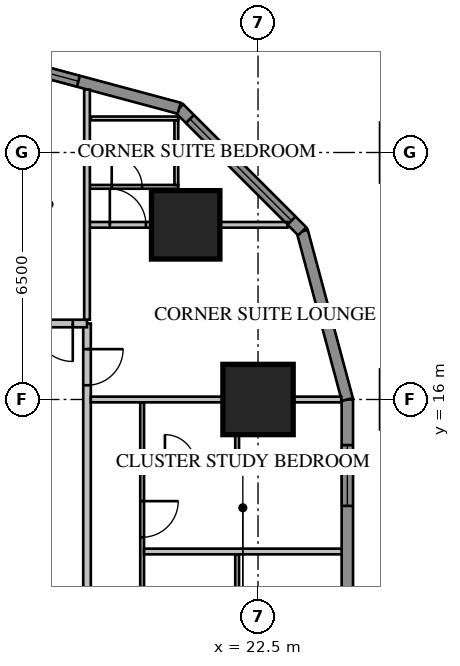
"""IFC4 building model, lengths in metres.
Left out: names, types, materials, properties, quantities, classifications, styles, units other than length and angle.
Written with IfcOpenShell. Run it as: python <this file> out.ifc"""

import sys

from ifc_helpers import new_model, si_unit, direction, frame, frame_2d, origin, origin_2d, place, context, subcontext, project, spatial, rectangle, extrude, element, fill, save


model = new_model("IFC4")
c1 = context("Model", 3, precision=1e-05, world=origin(), true_north=direction((0.0, 1.0)))
c2 = subcontext(c1, "Body", "Model", "MODEL_VIEW")
j1 = project(units=[si_unit("LENGTHUNIT", "METRE"), si_unit("PLANEANGLEUNIT", "RADIAN")], contexts=[c1])
p1 = place(None, origin())
s1 = spatial("IfcSite", under=j1, at=p1, CompositionType="ELEMENT")
p2 = place(p1, origin())
s2 = spatial("IfcBuilding", under=s1, at=p2, CompositionType="ELEMENT")
p3 = place(p2, frame((0.0, 0.0, 42.95)))
s3 = spatial("IfcBuildingStorey", under=s2, at=p3, CompositionType="ELEMENT", Elevation=42.95)
p4 = place(p3, frame((22.5, 16.0, 0.0), z_axis=(0.0, 0.0, 1.0), x_axis=(1.0, 0.0, 0.0)))
e1 = element("IfcColumn", 1, at=p4, inside=s3, PredefinedType="COLUMN", context=c2, shape_type="SweptSolid", body=[
    extrude(rectangle(XDim=1.85, YDim=1.85, at=origin_2d()), origin(), (0.0, 0.0, 1.0), 3.85),
])
p5 = place(p3, frame((20.596, 20.596, 0.0), z_axis=(0.0, 0.0, 1.0), x_axis=(1.0, 0.0, 0.0)))
e2 = element("IfcColumn", 2, at=p5, inside=s3, PredefinedType="COLUMN", context=c2, shape_type="SweptSolid", body=[
    extrude(rectangle(XDim=1.8, YDim=1.8, at=origin_2d()), origin(), (0.0, 0.0, 1.0), 3.85),
])
p6 = place(p3, frame((24.85, -16.0, 0.0), z_axis=(0.0, 0.0, 1.0), x_axis=(0.0, 1.0, 0.0)))
e3 = element("IfcWall", 3, at=p6, inside=s3, PredefinedType="SOLIDWALL", context=c2, shape_type="SweptSolid", body=[
    extrude(rectangle(XDim=32.0, YDim=0.3, at=frame_2d((16.0, 0.0))), origin(), (0.0, 0.0, 1.0), 3.65),
])
p7 = place(p6, frame((1.2, 0.0, 0.75)))
e4 = element("IfcOpeningElement", 4, at=p7, cuts=e3, PredefinedType="OPENING", context=c2, shape_type="SweptSolid", body=[
    extrude(rectangle(XDim=1.6, YDim=1.8, at=frame_2d((0.8, 0.9))), frame((0.0, 0.17, 0.0), z_axis=(0.0, -1.0, 0.0), x_axis=(1.0, 0.0, 0.0)), (0.0, 0.0, 1.0), 0.34),
])
p8 = place(p6, frame((5.2, 0.0, 0.75)))
e5 = element("IfcOpeningElement", 5, at=p8, cuts=e3, PredefinedType="OPENING", context=c2, shape_type="SweptSolid", body=[
    extrude(rectangle(XDim=1.6, YDim=1.8, at=frame_2d((0.8, 0.9))), frame((0.0, 0.17, 0.0), z_axis=(0.0, -1.0, 0.0), x_axis=(1.0, 0.0, 0.0)), (0.0, 0.0, 1.0), 0.34),
])
p9 = place(p6, frame((17.2, 0.0, 0.75)))
e6 = element("IfcOpeningElement", 6, at=p9, cuts=e3, PredefinedType="OPENING", context=c2, shape_type="SweptSolid", body=[
    extrude(rectangle(XDim=1.6, YDim=1.8, at=frame_2d((0.8, 0.9))), frame((0.0, 0.17, 0.0), z_axis=(0.0, -1.0, 0.0), x_axis=(1.0, 0.0, 0.0)), (0.0, 0.0, 1.0), 0.34),
])
p10 = place(p6, frame((21.2, 0.0, 0.75)))
e7 = element("IfcOpeningElement", 7, at=p10, cuts=e3, PredefinedType="OPENING", context=c2, shape_type="SweptSolid", body=[
    extrude(rectangle(XDim=1.6, YDim=1.8, at=frame_2d((0.8, 0.9))), frame((0.0, 0.17, 0.0), z_axis=(0.0, -1.0, 0.0), x_axis=(1.0, 0.0, 0.0)), (0.0, 0.0, 1.0), 0.34),
])
p11 = place(p6, frame((25.2, 0.0, 0.75)))
e8 = element("IfcOpeningElement", 8, at=p11, cuts=e3, PredefinedType="OPENING", context=c2, shape_type="SweptSolid", body=[
    extrude(rectangle(XDim=1.6, YDim=1.8, at=frame_2d((0.8, 0.9))), frame((0.0, 0.17, 0.0), z_axis=(0.0, -1.0, 0.0), x_axis=(1.0, 0.0, 0.0)), (0.0, 0.0, 1.0), 0.34),
])
p12 = place(p6, frame((29.2, 0.0, 0.75)))
e9 = element("IfcOpeningElement", 9, at=p12, cuts=e3, PredefinedType="OPENING", context=c2, shape_type="SweptSolid", body=[
    extrude(rectangle(XDim=1.6, YDim=1.8, at=frame_2d((0.8, 0.9))), frame((0.0, 0.17, 0.0), z_axis=(0.0, -1.0, 0.0), x_axis=(1.0, 0.0, 0.0)), (0.0, 0.0, 1.0), 0.34),
])
p13 = place(p6, frame((8.8, 0.0, 0.75)))
e10 = element("IfcOpeningElement", 10, at=p13, cuts=e3, PredefinedType="OPENING", context=c2, shape_type="SweptSolid", body=[
    extrude(rectangle(XDim=2.4, YDim=1.8, at=frame_2d((1.2, 0.9))), frame((0.0, 0.17, 0.0), z_axis=(0.0, -1.0, 0.0), x_axis=(1.0, 0.0, 0.0)), (0.0, 0.0, 1.0), 0.34),
])
p14 = place(p6, frame((13.812, 0.0, 0.0)))
e11 = element("IfcOpeningElement", 11, at=p14, cuts=e3, PredefinedType="OPENING", context=c2, shape_type="SweptSolid", body=[
    extrude(rectangle(XDim=1.0, YDim=2.4, at=frame_2d((0.5, 1.2))), frame((0.0, 0.17, 0.0), z_axis=(0.0, -1.0, 0.0), x_axis=(1.0, 0.0, 0.0)), (0.0, 0.0, 1.0), 0.34),
])
p15 = place(p3, frame((24.85, 16.0, 0.0), z_axis=(0.0, 0.0, 1.0), x_axis=(-0.258839972501, 0.965920218567, 0.0)))
e12 = element("IfcWall", 12, at=p15, inside=s3, PredefinedType="SOLIDWALL", context=c2, shape_type="SweptSolid", body=[
    extrude(rectangle(XDim=4.581, YDim=0.3, at=frame_2d((2.291, 0.0))), origin(), (0.0, 0.0, 1.0), 3.65),
])
p16 = place(p3, frame((23.664, 20.425, 0.0), z_axis=(0.0, 0.0, 1.0), x_axis=(-0.707106781187, 0.707106781187, 0.0)))
e13 = element("IfcWall", 13, at=p16, inside=s3, PredefinedType="SOLIDWALL", context=c2, shape_type="SweptSolid", body=[
    extrude(rectangle(XDim=4.581, YDim=0.3, at=frame_2d((2.291, 0.0))), origin(), (0.0, 0.0, 1.0), 3.65),
])
p17 = place(p16, frame((0.4, 0.0, 0.75)))
e14 = element("IfcOpeningElement", 14, at=p17, cuts=e13, PredefinedType="OPENING", context=c2, shape_type="SweptSolid", body=[
    extrude(rectangle(XDim=3.781, YDim=1.8, at=frame_2d((1.891, 0.9))), frame((0.0, 0.17, 0.0), z_axis=(0.0, -1.0, 0.0), x_axis=(1.0, 0.0, 0.0)), (0.0, 0.0, 1.0), 0.34),
])
p18 = place(p3, frame((20.425, 23.664, 0.0), z_axis=(0.0, 0.0, 1.0), x_axis=(-0.965920218567, 0.258839972501, 0.0)))
e15 = element("IfcWall", 15, at=p18, inside=s3, PredefinedType="SOLIDWALL", context=c2, shape_type="SweptSolid", body=[
    extrude(rectangle(XDim=4.581, YDim=0.3, at=frame_2d((2.291, 0.0))), origin(), (0.0, 0.0, 1.0), 3.65),
])
p19 = place(p18, frame((2.746, 0.0, 0.75)))
e16 = element("IfcOpeningElement", 16, at=p19, cuts=e15, PredefinedType="OPENING", context=c2, shape_type="SweptSolid", body=[
    extrude(rectangle(XDim=1.6, YDim=1.8, at=frame_2d((0.8, 0.9))), frame((0.0, 0.17, 0.0), z_axis=(0.0, -1.0, 0.0), x_axis=(1.0, 0.0, 0.0)), (0.0, 0.0, 1.0), 0.34),
])
p20 = place(p3, frame((18.0, -18.0, 0.0), z_axis=(0.0, 0.0, 1.0), x_axis=(0.0, 1.0, 0.0)))
e17 = element("IfcWall", 17, at=p20, inside=s3, PredefinedType="PARTITIONING", context=c2, shape_type="SweptSolid", body=[
    extrude(rectangle(XDim=36.0, YDim=0.2, at=frame_2d((18.0, 0.0))), origin(), (0.0, 0.0, 1.0), 3.65),
])
p21 = place(p20, frame((10.4, 0.0, 0.0)))
e18 = element("IfcOpeningElement", 18, at=p21, cuts=e17, PredefinedType="OPENING", context=c2, shape_type="SweptSolid", body=[
    extrude(rectangle(XDim=1.0, YDim=2.1, at=frame_2d((0.5, 1.05))), frame((0.0, 0.12, 0.0), z_axis=(0.0, -1.0, 0.0), x_axis=(1.0, 0.0, 0.0)), (0.0, 0.0, 1.0), 0.24),
])
p22 = place(p20, frame((14.4, 0.0, 0.0)))
e19 = element("IfcOpeningElement", 19, at=p22, cuts=e17, PredefinedType="OPENING", context=c2, shape_type="SweptSolid", body=[
    extrude(rectangle(XDim=1.0, YDim=2.1, at=frame_2d((0.5, 1.05))), frame((0.0, 0.12, 0.0), z_axis=(0.0, -1.0, 0.0), x_axis=(1.0, 0.0, 0.0)), (0.0, 0.0, 1.0), 0.24),
])
p23 = place(p20, frame((0.375, 0.0, 0.0)))
e20 = element("IfcOpeningElement", 20, at=p23, cuts=e17, PredefinedType="OPENING", context=c2, shape_type="SweptSolid", body=[
    extrude(rectangle(XDim=1.0, YDim=2.1, at=frame_2d((0.5, 1.05))), frame((0.0, 0.12, 0.0), z_axis=(0.0, -1.0, 0.0), x_axis=(1.0, 0.0, 0.0)), (0.0, 0.0, 1.0), 0.24),
])
p24 = place(p20, frame((34.375, 0.0, 0.0)))
e21 = element("IfcOpeningElement", 21, at=p24, cuts=e17, PredefinedType="OPENING", context=c2, shape_type="SweptSolid", body=[
    extrude(rectangle(XDim=0.95, YDim=2.1, at=frame_2d((0.475, 1.05))), frame((0.0, 0.12, 0.0), z_axis=(0.0, -1.0, 0.0), x_axis=(1.0, 0.0, 0.0)), (0.0, 0.0, 1.0), 0.24),
])
p25 = place(p3, frame((19.45, -3.925, 0.0), z_axis=(0.0, 0.0, 1.0), x_axis=(0.0, 1.0, 0.0)))
e22 = element("IfcWall", 22, at=p25, inside=s3, PredefinedType="PARTITIONING", context=c2, shape_type="SweptSolid", body=[
    extrude(rectangle(XDim=19.85, YDim=0.1, at=frame_2d((9.925, 0.0))), origin(), (0.0, 0.0, 1.0), 3.65),
])
p26 = place(p25, frame((2.125, 0.0, 0.0)))
e23 = element("IfcOpeningElement", 23, at=p26, cuts=e22, PredefinedType="OPENING", context=c2, shape_type="SweptSolid", body=[
    extrude(rectangle(XDim=1.0, YDim=2.1, at=frame_2d((0.5, 1.05))), frame((0.0, 0.07, 0.0), z_axis=(0.0, -1.0, 0.0), x_axis=(1.0, 0.0, 0.0)), (0.0, 0.0, 1.0), 0.14),
])
p27 = place(p25, frame((0.3, 0.0, 0.0)))
e24 = element("IfcOpeningElement", 24, at=p27, cuts=e22, PredefinedType="OPENING", context=c2, shape_type="SweptSolid", body=[
    extrude(rectangle(XDim=0.8, YDim=2.1, at=frame_2d((0.4, 1.05))), frame((0.0, 0.07, 0.0), z_axis=(0.0, -1.0, 0.0), x_axis=(1.0, 0.0, 0.0)), (0.0, 0.0, 1.0), 0.14),
])
p28 = place(p25, frame((4.3, 0.0, 0.0)))
e25 = element("IfcOpeningElement", 25, at=p28, cuts=e22, PredefinedType="OPENING", context=c2, shape_type="SweptSolid", body=[
    extrude(rectangle(XDim=0.95, YDim=2.1, at=frame_2d((0.475, 1.05))), frame((0.0, 0.07, 0.0), z_axis=(0.0, -1.0, 0.0), x_axis=(1.0, 0.0, 0.0)), (0.0, 0.0, 1.0), 0.14),
])
p29 = place(p25, frame((8.3, 0.0, 0.0)))
e26 = element("IfcOpeningElement", 26, at=p29, cuts=e22, PredefinedType="OPENING", context=c2, shape_type="SweptSolid", body=[
    extrude(rectangle(XDim=0.95, YDim=2.1, at=frame_2d((0.475, 1.05))), frame((0.0, 0.07, 0.0), z_axis=(0.0, -1.0, 0.0), x_axis=(1.0, 0.0, 0.0)), (0.0, 0.0, 1.0), 0.14),
])
p30 = place(p25, frame((12.3, 0.0, 0.0)))
e27 = element("IfcOpeningElement", 27, at=p30, cuts=e22, PredefinedType="OPENING", context=c2, shape_type="SweptSolid", body=[
    extrude(rectangle(XDim=0.95, YDim=2.1, at=frame_2d((0.475, 1.05))), frame((0.0, 0.07, 0.0), z_axis=(0.0, -1.0, 0.0), x_axis=(1.0, 0.0, 0.0)), (0.0, 0.0, 1.0), 0.14),
])
p31 = place(p25, frame((16.3, 0.0, 0.0)))
e28 = element("IfcOpeningElement", 28, at=p31, cuts=e22, PredefinedType="OPENING", context=c2, shape_type="SweptSolid", body=[
    extrude(rectangle(XDim=0.95, YDim=2.1, at=frame_2d((0.475, 1.05))), frame((0.0, 0.07, 0.0), z_axis=(0.0, -1.0, 0.0), x_axis=(1.0, 0.0, 0.0)), (0.0, 0.0, 1.0), 0.14),
])
p32 = place(p3, frame((19.5, 12.0, 0.0), z_axis=(0.0, 0.0, 1.0), x_axis=(1.0, 0.0, 0.0)))
e29 = element("IfcWall", 29, at=p32, inside=s3, PredefinedType="PARTITIONING", context=c2, shape_type="SweptSolid", body=[
    extrude(rectangle(XDim=5.2, YDim=0.15, at=frame_2d((2.6, 0.0))), origin(), (0.0, 0.0, 1.0), 3.65),
])
p33 = place(p3, frame((18.1, 16.0, 0.0), z_axis=(0.0, 0.0, 1.0), x_axis=(1.0, 0.0, 0.0)))
e30 = element("IfcWall", 30, at=p33, inside=s3, PredefinedType="PARTITIONING", context=c2, shape_type="SweptSolid", body=[
    extrude(rectangle(XDim=6.589, YDim=0.15, at=frame_2d((3.295, 0.0))), origin(), (0.0, 0.0, 1.0), 3.65),
])
p34 = place(p3, frame((21.95, 10.325, 0.0), z_axis=(0.0, 0.0, 1.0), x_axis=(0.0, 1.0, 0.0)))
e31 = element("IfcWall", 31, at=p34, inside=s3, PredefinedType="PARTITIONING", context=c2, shape_type="SweptSolid", body=[
    extrude(rectangle(XDim=1.6, YDim=0.1, at=frame_2d((0.8, 0.0))), origin(), (0.0, 0.0, 1.0), 3.65),
])
p35 = place(p3, frame((19.5, 14.275, 0.0), z_axis=(0.0, 0.0, 1.0), x_axis=(1.0, 0.0, 0.0)))
e32 = element("IfcWall", 32, at=p35, inside=s3, PredefinedType="PARTITIONING", context=c2, shape_type="SweptSolid", body=[
    extrude(rectangle(XDim=2.5, YDim=0.1, at=frame_2d((1.25, 0.0))), origin(), (0.0, 0.0, 1.0), 3.65),
])
p36 = place(p35, frame((0.55, 0.0, 0.0)))
e33 = element("IfcOpeningElement", 33, at=p36, cuts=e32, PredefinedType="OPENING", context=c2, shape_type="SweptSolid", body=[
    extrude(rectangle(XDim=0.8, YDim=2.1, at=frame_2d((0.4, 1.05))), frame((0.0, 0.07, 0.0), z_axis=(0.0, -1.0, 0.0), x_axis=(1.0, 0.0, 0.0)), (0.0, 0.0, 1.0), 0.14),
])
p37 = place(p3, frame((21.95, 14.325, 0.0), z_axis=(0.0, 0.0, 1.0), x_axis=(0.0, 1.0, 0.0)))
e34 = element("IfcWall", 34, at=p37, inside=s3, PredefinedType="PARTITIONING", context=c2, shape_type="SweptSolid", body=[
    extrude(rectangle(XDim=1.6, YDim=0.1, at=frame_2d((0.8, 0.0))), origin(), (0.0, 0.0, 1.0), 3.65),
])
p38 = place(p3, frame((18.065, 21.596, 0.0), z_axis=(0.0, 0.0, 1.0), x_axis=(1.0, 0.0, 0.0)))
e35 = element("IfcWall", 35, at=p38, inside=s3, PredefinedType="PARTITIONING", context=c2, shape_type="SweptSolid", body=[
    extrude(rectangle(XDim=2.335, YDim=0.1, at=frame_2d((1.167, 0.0))), origin(), (0.0, 0.0, 1.0), 3.65),
])
p39 = place(p38, frame((0.585, 0.0, 0.0)))
e36 = element("IfcOpeningElement", 36, at=p39, cuts=e35, PredefinedType="OPENING", context=c2, shape_type="SweptSolid", body=[
    extrude(rectangle(XDim=0.8, YDim=2.1, at=frame_2d((0.4, 1.05))), frame((0.0, 0.07, 0.0), z_axis=(0.0, -1.0, 0.0), x_axis=(1.0, 0.0, 0.0)), (0.0, 0.0, 1.0), 0.14),
])
p40 = place(p3, frame((20.35, 21.646, 0.0), z_axis=(0.0, 0.0, 1.0), x_axis=(0.0, 1.0, 0.0)))
e37 = element("IfcWall", 37, at=p40, inside=s3, PredefinedType="PARTITIONING", context=c2, shape_type="SweptSolid", body=[
    extrude(rectangle(XDim=1.7, YDim=0.1, at=frame_2d((0.85, 0.0))), origin(), (0.0, 0.0, 1.0), 3.65),
])
p41 = place(p3, frame((18.1, 23.396, 0.0), z_axis=(0.0, 0.0, 1.0), x_axis=(1.0, 0.0, 0.0)))
e38 = element("IfcWall", 38, at=p41, inside=s3, PredefinedType="PARTITIONING", context=c2, shape_type="SweptSolid", body=[
    extrude(rectangle(XDim=2.3, YDim=0.1, at=frame_2d((1.15, 0.0))), origin(), (0.0, 0.0, 1.0), 3.65),
])
p42 = place(p3, frame((18.065, 20.596, 0.0), z_axis=(0.0, 0.0, 1.0), x_axis=(1.0, 0.0, 0.0)))
e39 = element("IfcWall", 39, at=p42, inside=s3, PredefinedType="PARTITIONING", context=c2, shape_type="SweptSolid", body=[
    extrude(rectangle(XDim=5.209, YDim=0.15, at=frame_2d((2.604, 0.0))), origin(), (0.0, 0.0, 1.0), 3.65),
])
p43 = place(p42, frame((0.535, 0.0, 0.0)))
e40 = element("IfcOpeningElement", 40, at=p43, cuts=e39, PredefinedType="OPENING", context=c2, shape_type="SweptSolid", body=[
    extrude(rectangle(XDim=0.95, YDim=2.1, at=frame_2d((0.475, 1.05))), frame((0.0, 0.095, 0.0), z_axis=(0.0, -1.0, 0.0), x_axis=(1.0, 0.0, 0.0)), (0.0, 0.0, 1.0), 0.19),
])
p44 = place(p3, frame((18.0, 18.0, 0.0), z_axis=(0.0, 0.0, 1.0), x_axis=(-1.0, 0.0, 0.0)))
e41 = element("IfcWall", 41, at=p44, inside=s3, PredefinedType="PARTITIONING", context=c2, shape_type="SweptSolid", body=[
    extrude(rectangle(XDim=36.0, YDim=0.2, at=frame_2d((18.0, 0.0))), origin(), (0.0, 0.0, 1.0), 3.65),
])
p45 = place(p44, frame((0.375, 0.0, 0.0)))
e42 = element("IfcOpeningElement", 42, at=p45, cuts=e41, PredefinedType="OPENING", context=c2, shape_type="SweptSolid", body=[
    extrude(rectangle(XDim=1.0, YDim=2.1, at=frame_2d((0.5, 1.05))), frame((0.0, 0.12, 0.0), z_axis=(0.0, -1.0, 0.0), x_axis=(1.0, 0.0, 0.0)), (0.0, 0.0, 1.0), 0.24),
])
p46 = place(p44, frame((3.95, 0.0, 0.0)))
e43 = element("IfcOpeningElement", 43, at=p46, cuts=e41, PredefinedType="OPENING", context=c2, shape_type="SweptSolid", body=[
    extrude(rectangle(XDim=0.95, YDim=2.1, at=frame_2d((0.475, 1.05))), frame((0.0, 0.12, 0.0), z_axis=(0.0, -1.0, 0.0), x_axis=(1.0, 0.0, 0.0)), (0.0, 0.0, 1.0), 0.24),
])
p47 = place(p44, frame((7.95, 0.0, 0.0)))
e44 = element("IfcOpeningElement", 44, at=p47, cuts=e41, PredefinedType="OPENING", context=c2, shape_type="SweptSolid", body=[
    extrude(rectangle(XDim=0.95, YDim=2.1, at=frame_2d((0.475, 1.05))), frame((0.0, 0.12, 0.0), z_axis=(0.0, -1.0, 0.0), x_axis=(1.0, 0.0, 0.0)), (0.0, 0.0, 1.0), 0.24),
])
p48 = place(p44, frame((19.95, 0.0, 0.0)))
e45 = element("IfcOpeningElement", 45, at=p48, cuts=e41, PredefinedType="OPENING", context=c2, shape_type="SweptSolid", body=[
    extrude(rectangle(XDim=0.95, YDim=2.1, at=frame_2d((0.475, 1.05))), frame((0.0, 0.12, 0.0), z_axis=(0.0, -1.0, 0.0), x_axis=(1.0, 0.0, 0.0)), (0.0, 0.0, 1.0), 0.24),
])
p49 = place(p44, frame((23.95, 0.0, 0.0)))
e46 = element("IfcOpeningElement", 46, at=p49, cuts=e41, PredefinedType="OPENING", context=c2, shape_type="SweptSolid", body=[
    extrude(rectangle(XDim=0.95, YDim=2.1, at=frame_2d((0.475, 1.05))), frame((0.0, 0.12, 0.0), z_axis=(0.0, -1.0, 0.0), x_axis=(1.0, 0.0, 0.0)), (0.0, 0.0, 1.0), 0.24),
])
p50 = place(p44, frame((27.95, 0.0, 0.0)))
e47 = element("IfcOpeningElement", 47, at=p50, cuts=e41, PredefinedType="OPENING", context=c2, shape_type="SweptSolid", body=[
    extrude(rectangle(XDim=0.95, YDim=2.1, at=frame_2d((0.475, 1.05))), frame((0.0, 0.12, 0.0), z_axis=(0.0, -1.0, 0.0), x_axis=(1.0, 0.0, 0.0)), (0.0, 0.0, 1.0), 0.24),
])
p51 = place(p44, frame((31.95, 0.0, 0.0)))
e48 = element("IfcOpeningElement", 48, at=p51, cuts=e41, PredefinedType="OPENING", context=c2, shape_type="SweptSolid", body=[
    extrude(rectangle(XDim=0.95, YDim=2.1, at=frame_2d((0.475, 1.05))), frame((0.0, 0.12, 0.0), z_axis=(0.0, -1.0, 0.0), x_axis=(1.0, 0.0, 0.0)), (0.0, 0.0, 1.0), 0.24),
])
p52 = place(p44, frame((34.375, 0.0, 0.0)))
e49 = element("IfcOpeningElement", 49, at=p52, cuts=e41, PredefinedType="OPENING", context=c2, shape_type="SweptSolid", body=[
    extrude(rectangle(XDim=0.95, YDim=2.1, at=frame_2d((0.475, 1.05))), frame((0.0, 0.12, 0.0), z_axis=(0.0, -1.0, 0.0), x_axis=(1.0, 0.0, 0.0)), (0.0, 0.0, 1.0), 0.24),
])
p53 = place(p44, frame((11.2, 0.0, 0.0)))
e50 = element("IfcOpeningElement", 50, at=p53, cuts=e41, PredefinedType="OPENING", context=c2, shape_type="SweptSolid", body=[
    extrude(rectangle(XDim=1.0, YDim=2.1, at=frame_2d((0.5, 1.05))), frame((0.0, 0.12, 0.0), z_axis=(0.0, -1.0, 0.0), x_axis=(1.0, 0.0, 0.0)), (0.0, 0.0, 1.0), 0.24),
])
p54 = place(p44, frame((15.2, 0.0, 0.0)))
e51 = element("IfcOpeningElement", 51, at=p54, cuts=e41, PredefinedType="OPENING", context=c2, shape_type="SweptSolid", body=[
    extrude(rectangle(XDim=1.0, YDim=2.1, at=frame_2d((0.5, 1.05))), frame((0.0, 0.12, 0.0), z_axis=(0.0, -1.0, 0.0), x_axis=(1.0, 0.0, 0.0)), (0.0, 0.0, 1.0), 0.24),
])
p55 = place(p3, frame((18.0, 18.1, 0.0), z_axis=(0.0, 0.0, 1.0), x_axis=(0.0, 1.0, 0.0)))
e52 = element("IfcWall", 52, at=p55, inside=s3, PredefinedType="PARTITIONING", context=c2, shape_type="SweptSolid", body=[
    extrude(rectangle(XDim=6.053, YDim=0.15, at=frame_2d((3.027, 0.0))), origin(), (0.0, 0.0, 1.0), 3.65),
])
p56 = place(p12, origin())
e53 = element("IfcWindow", 53, at=p56, inside=s3, PartitioningType="SINGLE_PANEL", PredefinedType="WINDOW", context=c2, shape_type="SweptSolid", body=[
    extrude(rectangle(XDim=1.6, YDim=1.8, at=frame_2d((0.8, 0.9))), frame((0.0, 0.03, 0.0), z_axis=(0.0, -1.0, 0.0), x_axis=(1.0, 0.0, 0.0)), (0.0, 0.0, 1.0), 0.06),
])
fill(e9, e53)
p57 = place(p17, origin())
e54 = element("IfcWindow", 54, at=p57, inside=s3, PartitioningType="SINGLE_PANEL", PredefinedType="WINDOW", context=c2, shape_type="SweptSolid", body=[
    extrude(rectangle(XDim=3.781, YDim=1.8, at=frame_2d((1.891, 0.9))), frame((0.0, 0.03, 0.0), z_axis=(0.0, -1.0, 0.0), x_axis=(1.0, 0.0, 0.0)), (0.0, 0.0, 1.0), 0.06),
])
fill(e14, e54)
p58 = place(p19, origin())
e55 = element("IfcWindow", 55, at=p58, inside=s3, PartitioningType="SINGLE_PANEL", PredefinedType="WINDOW", context=c2, shape_type="SweptSolid", body=[
    extrude(rectangle(XDim=1.6, YDim=1.8, at=frame_2d((0.8, 0.9))), frame((0.0, 0.03, 0.0), z_axis=(0.0, -1.0, 0.0), x_axis=(1.0, 0.0, 0.0)), (0.0, 0.0, 1.0), 0.06),
])
fill(e16, e55)
p59 = place(p31, origin())
e56 = element("IfcDoor", 56, at=p59, inside=s3, OperationType="SINGLE_SWING_RIGHT", PredefinedType="DOOR", context=c2, shape_type="SweptSolid", body=[
    extrude(rectangle(XDim=0.95, YDim=2.1, at=frame_2d((0.475, 1.05))), frame((0.0, 0.025, 0.0), z_axis=(0.0, -1.0, 0.0), x_axis=(1.0, 0.0, 0.0)), (0.0, 0.0, 1.0), 0.05),
])
fill(e28, e56)
p60 = place(p36, origin())
e57 = element("IfcDoor", 57, at=p60, inside=s3, OperationType="SINGLE_SWING_LEFT", PredefinedType="DOOR", context=c2, shape_type="SweptSolid", body=[
    extrude(rectangle(XDim=0.8, YDim=2.1, at=frame_2d((0.4, 1.05))), frame((0.0, 0.025, 0.0), z_axis=(0.0, -1.0, 0.0), x_axis=(1.0, 0.0, 0.0)), (0.0, 0.0, 1.0), 0.05),
])
fill(e33, e57)
p61 = place(p24, origin())
e58 = element("IfcDoor", 58, at=p61, inside=s3, OperationType="SINGLE_SWING_RIGHT", PredefinedType="DOOR", context=c2, shape_type="SweptSolid", body=[
    extrude(rectangle(XDim=0.95, YDim=2.1, at=frame_2d((0.475, 1.05))), frame((0.0, 0.025, 0.0), z_axis=(0.0, -1.0, 0.0), x_axis=(1.0, 0.0, 0.0)), (0.0, 0.0, 1.0), 0.05),
])
fill(e21, e58)
p62 = place(p39, origin())
e59 = element("IfcDoor", 59, at=p62, inside=s3, OperationType="SINGLE_SWING_LEFT", PredefinedType="DOOR", context=c2, shape_type="SweptSolid", body=[
    extrude(rectangle(XDim=0.8, YDim=2.1, at=frame_2d((0.4, 1.05))), frame((0.0, 0.025, 0.0), z_axis=(0.0, -1.0, 0.0), x_axis=(1.0, 0.0, 0.0)), (0.0, 0.0, 1.0), 0.05),
])
fill(e36, e59)
p63 = place(p43, origin())
e60 = element("IfcDoor", 60, at=p63, inside=s3, OperationType="SINGLE_SWING_LEFT", PredefinedType="DOOR", context=c2, shape_type="SweptSolid", body=[
    extrude(rectangle(XDim=0.95, YDim=2.1, at=frame_2d((0.475, 1.05))), frame((0.0, 0.025, 0.0), z_axis=(0.0, -1.0, 0.0), x_axis=(1.0, 0.0, 0.0)), (0.0, 0.0, 1.0), 0.05),
])
fill(e40, e60)
p64 = place(p45, origin())
e61 = element("IfcDoor", 61, at=p64, inside=s3, OperationType="SINGLE_SWING_LEFT", PredefinedType="DOOR", context=c2, shape_type="SweptSolid", body=[
    extrude(rectangle(XDim=1.0, YDim=2.1, at=frame_2d((0.5, 1.05))), frame((0.0, 0.025, 0.0), z_axis=(0.0, -1.0, 0.0), x_axis=(1.0, 0.0, 0.0)), (0.0, 0.0, 1.0), 0.05),
])
fill(e42, e61)
save(model, sys.argv[1])
